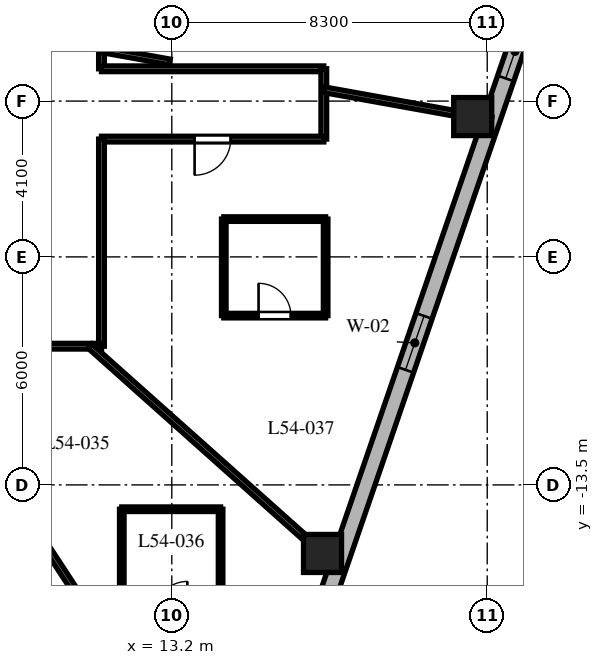
"""IFC4 building model, lengths in metres.
Left out: names, types, materials, properties, quantities, classifications, styles, units other than length and angle.
Written with IfcOpenShell. Run it as: python <this file> out.ifc"""

import sys

from ifc_helpers import new_model, si_unit, direction, frame, frame_2d, origin, origin_2d, place, context, subcontext, project, spatial, rectangle, extrude, element, fill, save


model = new_model("IFC4")
c1 = context("Model", 3, precision=1e-05, world=origin(), true_north=direction((0.0, 1.0)))
c2 = subcontext(c1, "Body", "Model", "MODEL_VIEW")
j1 = project(units=[si_unit("LENGTHUNIT", "METRE"), si_unit("PLANEANGLEUNIT", "RADIAN")], contexts=[c1])
p1 = place(None, origin())
s1 = spatial("IfcSite", under=j1, at=p1, CompositionType="ELEMENT")
p2 = place(p1, origin())
s2 = spatial("IfcBuilding", under=s1, at=p2, CompositionType="ELEMENT")
p3 = place(p2, frame((0.0, 0.0, 217.9)))
s3 = spatial("IfcBuildingStorey", under=s2, at=p3, CompositionType="ELEMENT", Elevation=217.9)
for number, where, z_axis, x_axis in (
    (1, (17.166, -15.304, 0.0), (0.0, 0.0, 1.0), (1.0, 0.0, 0.0)),
    (2, (21.118, -3.807, 0.0), (0.0, 0.0, 1.0), (1.0, 0.0, 0.0)),
):
    element("IfcColumn", number, at=place(p3, frame(where, z_axis=z_axis, x_axis=x_axis)), inside=s3, PredefinedType="COLUMN", context=c2, shape_type="SweptSolid", body=[
        extrude(rectangle(XDim=1.0, YDim=1.0, at=origin_2d()), origin(), (0.0, 0.0, 1.0), 3.8),
    ])
p4 = place(p3, frame((16.324, -19.275, 0.0), z_axis=(0.0, 0.0, 1.0), x_axis=(0.325083142304, 0.945685439557, 0.0)))
e3 = element("IfcWall", 3, at=p4, inside=s3, PredefinedType="SOLIDWALL", context=c2, shape_type="SweptSolid", body=[
    extrude(rectangle(XDim=20.224, YDim=0.45, at=frame_2d((10.112, 0.0))), origin(), (0.0, 0.0, 1.0), 3.5),
])
p5 = place(p4, frame((1.253, 0.0, 0.8)))
e4 = element("IfcOpeningElement", 4, at=p5, cuts=e3, PredefinedType="OPENING", context=c2, shape_type="SweptSolid", body=[
    extrude(rectangle(XDim=1.5, YDim=1.8, at=frame_2d((0.75, 0.9))), frame((0.0, 0.235, 0.0), z_axis=(0.0, -1.0, 0.0), x_axis=(1.0, 0.0, 0.0)), (0.0, 0.0, 1.0), 0.47),
])
p6 = place(p4, frame((9.309, 0.0, 0.8)))
e5 = element("IfcOpeningElement", 5, at=p6, cuts=e3, PredefinedType="OPENING", context=c2, shape_type="SweptSolid", body=[
    extrude(rectangle(XDim=1.5, YDim=1.8, at=frame_2d((0.75, 0.9))), frame((0.0, 0.235, 0.0), z_axis=(0.0, -1.0, 0.0), x_axis=(1.0, 0.0, 0.0)), (0.0, 0.0, 1.0), 0.47),
])
p7 = place(p4, frame((17.418, 0.0, 0.8)))
e6 = element("IfcOpeningElement", 6, at=p7, cuts=e3, PredefinedType="OPENING", context=c2, shape_type="SweptSolid", body=[
    extrude(rectangle(XDim=1.5, YDim=1.8, at=frame_2d((0.75, 0.9))), frame((0.0, 0.235, 0.0), z_axis=(0.0, -1.0, 0.0), x_axis=(1.0, 0.0, 0.0)), (0.0, 0.0, 1.0), 0.47),
])
p8 = place(p3, frame((11.35, 9.85, 0.0), z_axis=(0.0, 0.0, 1.0), x_axis=(0.0, -1.0, 0.0)))
e7 = element("IfcWall", 7, at=p8, inside=s3, PredefinedType="PARTITIONING", context=c2, shape_type="SweptSolid", body=[
    extrude(rectangle(XDim=12.4, YDim=0.15, at=frame_2d((6.2, 0.0))), origin(), (0.0, 0.0, 1.0), 2.99),
])
p9 = place(p8, frame((3.01, 0.0, 0.0)))
e8 = element("IfcOpeningElement", 8, at=p9, cuts=e7, PredefinedType="OPENING", context=c2, shape_type="SweptSolid", body=[
    extrude(rectangle(XDim=0.95, YDim=2.03, at=frame_2d((0.475, 1.015))), frame((0.0, 0.085, 0.0), z_axis=(0.0, -1.0, 0.0), x_axis=(1.0, 0.0, 0.0)), (0.0, 0.0, 1.0), 0.17),
])
p10 = place(p8, frame((8.835, 0.0, 0.0)))
e9 = element("IfcOpeningElement", 9, at=p10, cuts=e7, PredefinedType="OPENING", context=c2, shape_type="SweptSolid", body=[
    extrude(rectangle(XDim=0.95, YDim=2.03, at=frame_2d((0.475, 1.015))), frame((0.0, 0.085, 0.0), z_axis=(0.0, -1.0, 0.0), x_axis=(1.0, 0.0, 0.0)), (0.0, 0.0, 1.0), 0.17),
])
p11 = place(p3, frame((11.35, -2.55, 0.0), z_axis=(0.0, 0.0, 1.0), x_axis=(1.0, 0.0, 0.0)))
e10 = element("IfcWall", 10, at=p11, inside=s3, PredefinedType="PARTITIONING", context=c2, shape_type="SweptSolid", body=[
    extrude(rectangle(XDim=5.85, YDim=0.15, at=frame_2d((2.925, 0.0))), origin(), (0.0, 0.0, 1.0), 2.941),
])
p12 = place(p3, frame((17.2, -2.55, 0.0), z_axis=(0.0, 0.0, 1.0), x_axis=(0.0, -1.0, 0.0)))
e11 = element("IfcWall", 11, at=p12, inside=s3, PredefinedType="PARTITIONING", context=c2, shape_type="SweptSolid", body=[
    extrude(rectangle(XDim=1.85, YDim=0.15, at=frame_2d((0.925, 0.0))), origin(), (0.0, 0.0, 1.0), 2.941),
])
p13 = place(p3, frame((17.2, -4.4, 0.0), z_axis=(0.0, 0.0, 1.0), x_axis=(-1.0, 0.0, 0.0)))
e12 = element("IfcWall", 12, at=p13, inside=s3, PredefinedType="PARTITIONING", context=c2, shape_type="SweptSolid", body=[
    extrude(rectangle(XDim=5.85, YDim=0.15, at=frame_2d((2.925, 0.0))), origin(), (0.0, 0.0, 1.0), 2.941),
])
p14 = place(p13, frame((2.45, 0.0, 0.0)))
e13 = element("IfcOpeningElement", 13, at=p14, cuts=e12, PredefinedType="OPENING", context=c2, shape_type="SweptSolid", body=[
    extrude(rectangle(XDim=0.95, YDim=2.03, at=frame_2d((0.475, 1.015))), frame((0.0, 0.085, 0.0), z_axis=(0.0, -1.0, 0.0), x_axis=(1.0, 0.0, 0.0)), (0.0, 0.0, 1.0), 0.17),
])
p15 = place(p3, frame((11.35, -4.4, 0.0), z_axis=(0.0, 0.0, 1.0), x_axis=(0.0, -1.0, 0.0)))
e14 = element("IfcWall", 14, at=p15, inside=s3, PredefinedType="PARTITIONING", context=c2, shape_type="SweptSolid", body=[
    extrude(rectangle(XDim=5.45, YDim=0.15, at=frame_2d((2.725, 0.0))), origin(), (0.0, 0.0, 1.0), 2.99),
])
p16 = place(p3, frame((11.35, -9.85, 0.0), z_axis=(0.0, 0.0, 1.0), x_axis=(-1.0, 0.0, 0.0)))
e15 = element("IfcWall", 15, at=p16, inside=s3, PredefinedType="PARTITIONING", context=c2, shape_type="SweptSolid", body=[
    extrude(rectangle(XDim=10.43, YDim=0.15, at=frame_2d((5.215, 0.0))), origin(), (0.0, 0.0, 1.0), 2.99),
])
p17 = place(p16, frame((8.362, 0.0, 0.0)))
e16 = element("IfcOpeningElement", 16, at=p17, cuts=e15, PredefinedType="OPENING", context=c2, shape_type="SweptSolid", body=[
    extrude(rectangle(XDim=0.95, YDim=2.03, at=frame_2d((0.475, 1.015))), frame((0.0, 0.085, 0.0), z_axis=(0.0, -1.0, 0.0), x_axis=(1.0, 0.0, 0.0)), (0.0, 0.0, 1.0), 0.17),
])
p18 = place(p16, frame((5.73, 0.0, 0.0)))
e17 = element("IfcOpeningElement", 17, at=p18, cuts=e15, PredefinedType="OPENING", context=c2, shape_type="SweptSolid", body=[
    extrude(rectangle(XDim=0.9, YDim=2.03, at=frame_2d((0.45, 1.015))), frame((0.0, 0.085, 0.0), z_axis=(0.0, -1.0, 0.0), x_axis=(1.0, 0.0, 0.0)), (0.0, 0.0, 1.0), 0.17),
])
p19 = place(p16, frame((2.098, 0.0, 0.0)))
e18 = element("IfcOpeningElement", 18, at=p19, cuts=e15, PredefinedType="OPENING", context=c2, shape_type="SweptSolid", body=[
    extrude(rectangle(XDim=0.95, YDim=2.03, at=frame_2d((0.475, 1.015))), frame((0.0, 0.085, 0.0), z_axis=(0.0, -1.0, 0.0), x_axis=(1.0, 0.0, 0.0)), (0.0, 0.0, 1.0), 0.17),
])
p20 = place(p3, frame((6.444, -9.85, 0.0), z_axis=(0.0, 0.0, 1.0), x_axis=(0.547492333129, -0.836810698525, 0.0)))
e19 = element("IfcWall", 19, at=p20, inside=s3, PredefinedType="PARTITIONING", context=c2, shape_type="SweptSolid", body=[
    extrude(rectangle(XDim=13.616, YDim=0.15, at=frame_2d((6.808, 0.0))), origin(), (0.0, 0.0, 1.0), 2.74),
])
p21 = place(p3, frame((11.048, -9.85, 0.0), z_axis=(0.0, 0.0, 1.0), x_axis=(0.746444434655, -0.665447748492, 0.0)))
e20 = element("IfcWall", 20, at=p21, inside=s3, PredefinedType="PARTITIONING", context=c2, shape_type="SweptSolid", body=[
    extrude(rectangle(XDim=8.732, YDim=0.15, at=frame_2d((4.366, 0.0))), origin(), (0.0, 0.0, 1.0), 2.74),
])
p22 = place(p3, frame((11.35, -2.046, 0.0), z_axis=(0.0, 0.0, 1.0), x_axis=(0.984127783205, -0.177461281195, 0.0)))
e21 = element("IfcWall", 21, at=p22, inside=s3, PredefinedType="PARTITIONING", context=c2, shape_type="SweptSolid", body=[
    extrude(rectangle(XDim=1.826, YDim=0.15, at=frame_2d((0.913, 0.0))), origin(), (0.0, 0.0, 1.0), 3.5),
])
p23 = place(p3, frame((17.2, -3.101, 0.0), z_axis=(0.0, 0.0, 1.0), x_axis=(0.98413465883, -0.177423147559, 0.0)))
e22 = element("IfcWall", 22, at=p23, inside=s3, PredefinedType="PARTITIONING", context=c2, shape_type="SweptSolid", body=[
    extrude(rectangle(XDim=4.482, YDim=0.15, at=frame_2d((2.241, 0.0))), origin(), (0.0, 0.0, 1.0), 2.74),
])
p24 = place(p3, frame((14.484, -16.89, 0.0), z_axis=(0.0, 0.0, 1.0), x_axis=(0.0, 1.0, 0.0)))
e23 = element("IfcWall", 23, at=p24, inside=s3, PredefinedType="PARTITIONING", context=c2, shape_type="SweptSolid", body=[
    extrude(rectangle(XDim=2.75, YDim=0.12, at=frame_2d((1.375, 0.0))), origin(), (0.0, 0.0, 1.0), 2.74),
])
p25 = place(p3, frame((14.484, -14.14, 0.0), z_axis=(0.0, 0.0, 1.0), x_axis=(-1.0, 0.0, 0.0)))
e24 = element("IfcWall", 24, at=p25, inside=s3, PredefinedType="PARTITIONING", context=c2, shape_type="SweptSolid", body=[
    extrude(rectangle(XDim=2.6, YDim=0.12, at=frame_2d((1.3, 0.0))), origin(), (0.0, 0.0, 1.0), 3.027),
])
p26 = place(p3, frame((11.884, -14.14, 0.0), z_axis=(0.0, 0.0, 1.0), x_axis=(0.0, -1.0, 0.0)))
e25 = element("IfcWall", 25, at=p26, inside=s3, PredefinedType="PARTITIONING", context=c2, shape_type="SweptSolid", body=[
    extrude(rectangle(XDim=2.75, YDim=0.12, at=frame_2d((1.375, 0.0))), origin(), (0.0, 0.0, 1.0), 3.027),
])
p27 = place(p3, frame((14.568, -9.045, 0.0), z_axis=(0.0, 0.0, 1.0), x_axis=(1.0, 0.0, 0.0)))
e26 = element("IfcWall", 26, at=p27, inside=s3, PredefinedType="PARTITIONING", context=c2, shape_type="SweptSolid", body=[
    extrude(rectangle(XDim=2.68, YDim=0.12, at=frame_2d((1.34, 0.0))), origin(), (0.0, 0.0, 1.0), 3.073),
])
p28 = place(p27, frame((0.915, 0.0, 0.0)))
e27 = element("IfcOpeningElement", 27, at=p28, cuts=e26, PredefinedType="OPENING", context=c2, shape_type="SweptSolid", body=[
    extrude(rectangle(XDim=0.85, YDim=2.03, at=frame_2d((0.425, 1.015))), frame((0.0, 0.07, 0.0), z_axis=(0.0, -1.0, 0.0), x_axis=(1.0, 0.0, 0.0)), (0.0, 0.0, 1.0), 0.14),
])
p29 = place(p3, frame((17.248, -9.045, 0.0), z_axis=(0.0, 0.0, 1.0), x_axis=(0.0, 1.0, 0.0)))
e28 = element("IfcWall", 28, at=p29, inside=s3, PredefinedType="PARTITIONING", context=c2, shape_type="SweptSolid", body=[
    extrude(rectangle(XDim=2.54, YDim=0.12, at=frame_2d((1.27, 0.0))), origin(), (0.0, 0.0, 1.0), 3.5),
])
p30 = place(p3, frame((17.248, -6.505, 0.0), z_axis=(0.0, 0.0, 1.0), x_axis=(-1.0, 0.0, 0.0)))
e29 = element("IfcWall", 29, at=p30, inside=s3, PredefinedType="PARTITIONING", context=c2, shape_type="SweptSolid", body=[
    extrude(rectangle(XDim=2.68, YDim=0.12, at=frame_2d((1.34, 0.0))), origin(), (0.0, 0.0, 1.0), 3.073),
])
p31 = place(p3, frame((14.568, -6.505, 0.0), z_axis=(0.0, 0.0, 1.0), x_axis=(0.0, -1.0, 0.0)))
e30 = element("IfcWall", 30, at=p31, inside=s3, PredefinedType="PARTITIONING", context=c2, shape_type="SweptSolid", body=[
    extrude(rectangle(XDim=2.54, YDim=0.12, at=frame_2d((1.27, 0.0))), origin(), (0.0, 0.0, 1.0), 3.5),
])
p32 = place(p6, origin())
e31 = element("IfcWindow", 31, at=p32, inside=s3, PartitioningType="SINGLE_PANEL", PredefinedType="WINDOW", context=c2, shape_type="SweptSolid", body=[
    extrude(rectangle(XDim=1.5, YDim=1.8, at=frame_2d((0.75, 0.9))), frame((0.0, 0.03, 0.0), z_axis=(0.0, -1.0, 0.0), x_axis=(1.0, 0.0, 0.0)), (0.0, 0.0, 1.0), 0.06),
])
fill(e5, e31)
p33 = place(p7, origin())
e32 = element("IfcWindow", 32, at=p33, inside=s3, PartitioningType="SINGLE_PANEL", PredefinedType="WINDOW", context=c2, shape_type="SweptSolid", body=[
    extrude(rectangle(XDim=1.5, YDim=1.8, at=frame_2d((0.75, 0.9))), frame((0.0, 0.03, 0.0), z_axis=(0.0, -1.0, 0.0), x_axis=(1.0, 0.0, 0.0)), (0.0, 0.0, 1.0), 0.06),
])
fill(e6, e32)
p34 = place(p14, origin())
e33 = element("IfcDoor", 33, at=p34, inside=s3, OperationType="SINGLE_SWING_RIGHT", PredefinedType="DOOR", context=c2, shape_type="SweptSolid", body=[
    extrude(rectangle(XDim=0.95, YDim=2.03, at=frame_2d((0.475, 1.015))), frame((0.0, 0.025, 0.0), z_axis=(0.0, -1.0, 0.0), x_axis=(1.0, 0.0, 0.0)), (0.0, 0.0, 1.0), 0.05),
])
fill(e13, e33)
p35 = place(p28, origin())
e34 = element("IfcDoor", 34, at=p35, inside=s3, OperationType="SINGLE_SWING_LEFT", PredefinedType="DOOR", context=c2, shape_type="SweptSolid", body=[
    extrude(rectangle(XDim=0.85, YDim=2.03, at=frame_2d((0.425, 1.015))), frame((0.0, 0.025, 0.0), z_axis=(0.0, -1.0, 0.0), x_axis=(1.0, 0.0, 0.0)), (0.0, 0.0, 1.0), 0.05),
])
fill(e27, e34)
save(model, sys.argv[1])
